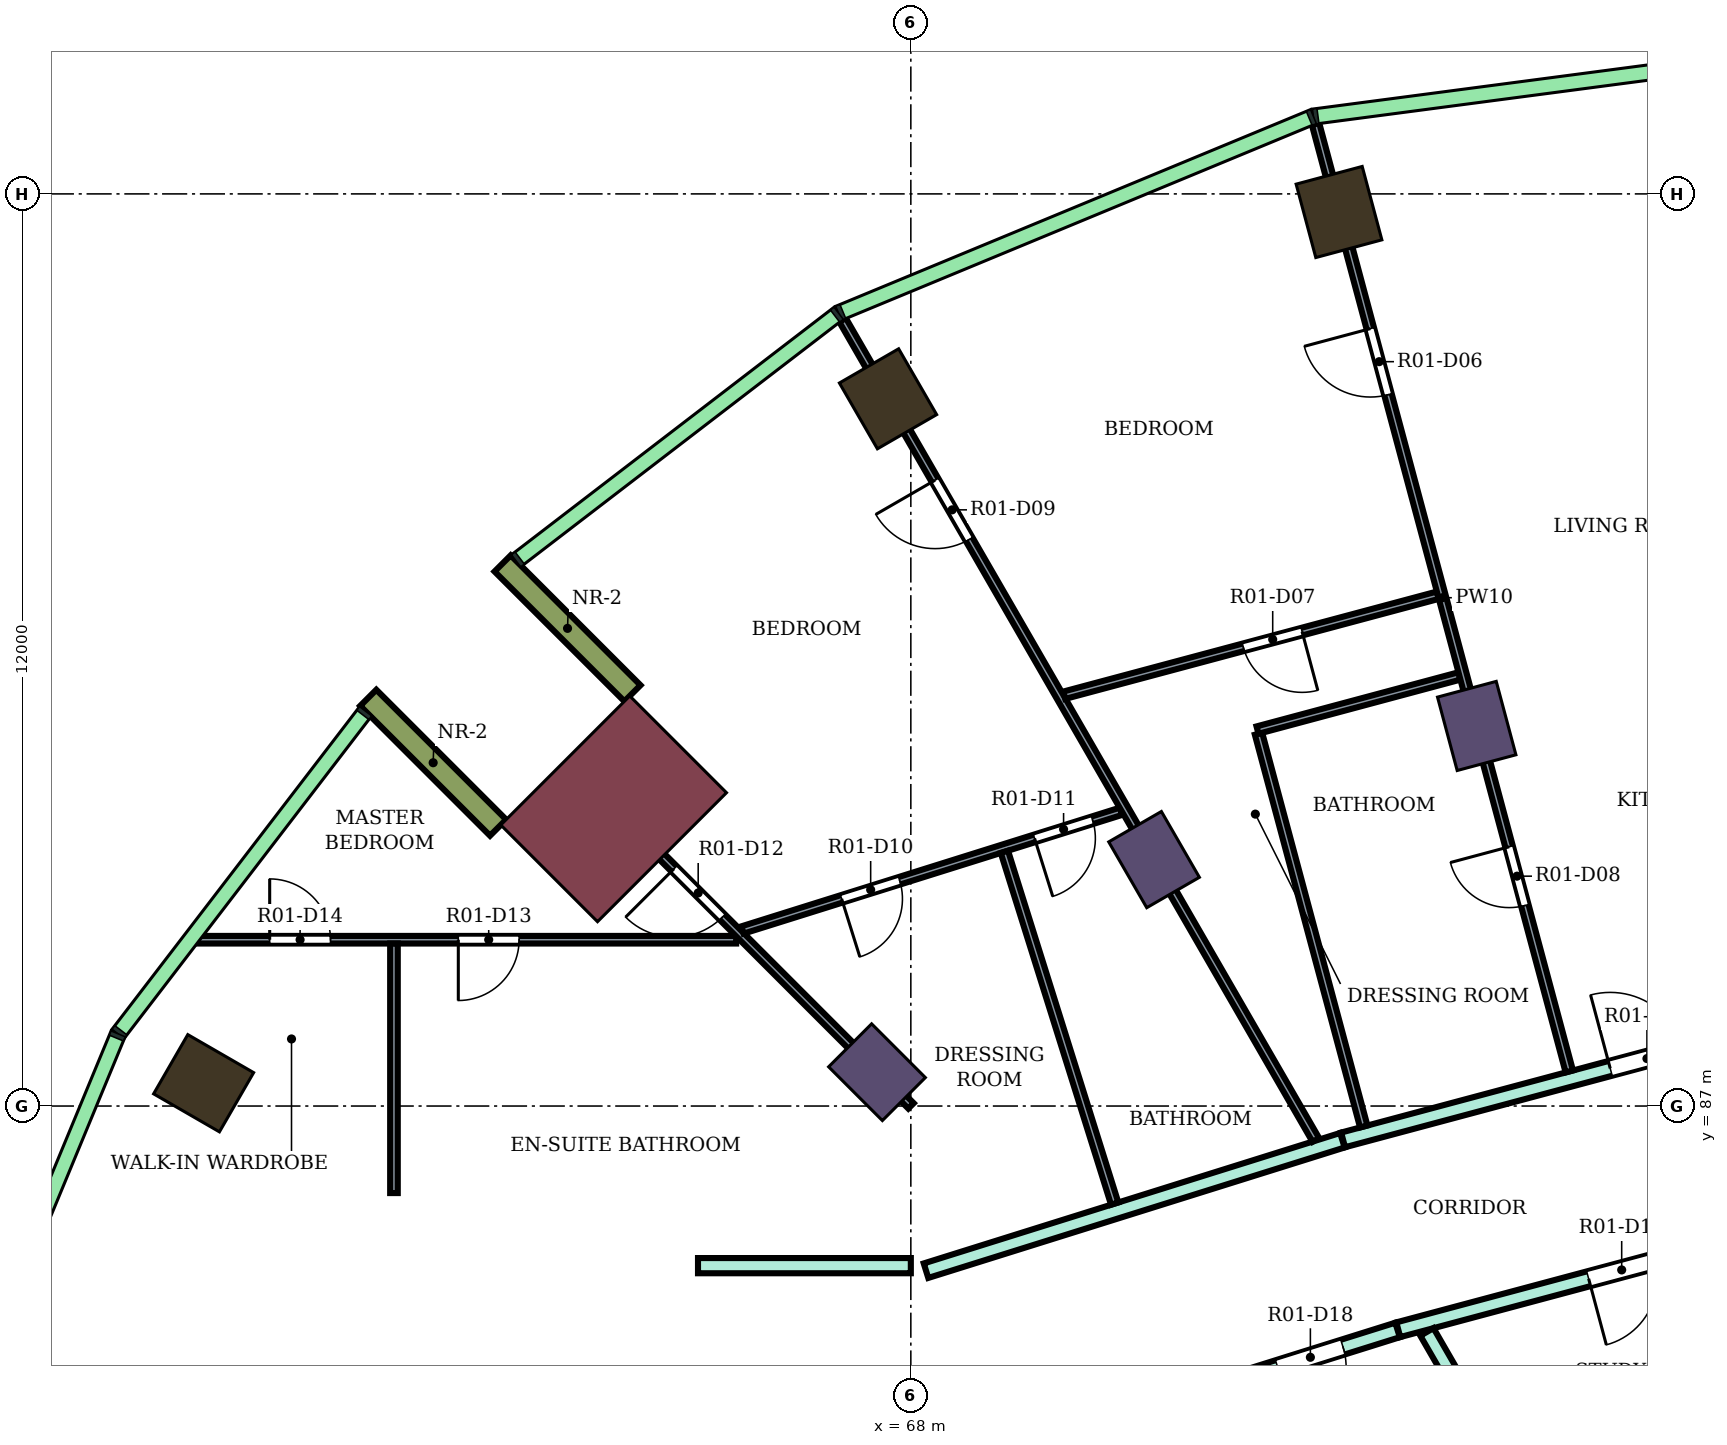
"""IFC4 building model, lengths in metres.
Left out: names, types, materials, properties, quantities, classifications, styles, units other than length and angle.
Written with IfcOpenShell. Run it as: python <this file> out.ifc"""

import sys

from ifc_helpers import new_model, si_unit, direction, frame, frame_2d, origin, origin_2d, place, context, subcontext, project, spatial, rectangle, extrude, element, fill, save


model = new_model("IFC4")
c1 = context("Model", 3, precision=1e-05, world=origin(), true_north=direction((0.0, 1.0)))
c2 = subcontext(c1, "Body", "Model", "MODEL_VIEW")
j1 = project(units=[si_unit("LENGTHUNIT", "METRE"), si_unit("PLANEANGLEUNIT", "RADIAN")], contexts=[c1])
p1 = place(None, origin())
s1 = spatial("IfcSite", under=j1, at=p1, CompositionType="ELEMENT")
p2 = place(p1, origin())
s2 = spatial("IfcBuilding", under=s1, at=p2, CompositionType="ELEMENT")
p3 = place(p2, frame((0.0, 0.0, 165.9)))
s3 = spatial("IfcBuildingStorey", under=s2, at=p3, CompositionType="ELEMENT", Elevation=165.9)
for number, where, z_axis, x_axis in (
    (1, (73.633, 98.762, 0.0), (0.0, 0.0, 1.0), (-0.259, 0.966, 0.0)),
    (2, (67.7, 96.304, 0.0), (0.0, 0.0, 1.0), (-0.5, 0.866, 0.0)),
    (3, (58.696, 87.3, 0.0), (0.0, 0.0, 1.0), (-0.866, 0.5, 0.0)),
):
    element("IfcColumn", number, at=place(p3, frame(where, z_axis=z_axis, x_axis=x_axis)), inside=s3, PredefinedType="COLUMN", context=c2, shape_type="SweptSolid", body=[
        extrude(rectangle(XDim=1.0, YDim=0.9, at=origin_2d()), origin(), (0.0, 0.0, 1.0), 4.1),
    ])
for number, where, z_axis, x_axis in (
    (4, (75.445, 92.0, 0.0), (0.0, 0.0, 1.0), (-0.259, 0.966, 0.0)),
    (5, (71.2, 90.242, 0.0), (0.0, 0.0, 1.0), (-0.5, 0.866, 0.0)),
    (6, (67.555, 87.445, 0.0), (0.0, 0.0, 1.0), (-0.707, 0.707, 0.0)),
):
    element("IfcColumn", number, at=place(p3, frame(where, z_axis=z_axis, x_axis=x_axis)), inside=s3, PredefinedType="COLUMN", context=c2, shape_type="SweptSolid", body=[
        extrude(rectangle(XDim=1.0, YDim=0.8, at=origin_2d()), origin(), (0.0, 0.0, 1.0), 4.1),
    ])
p4 = place(p3, frame((64.09, 90.91, 0.0), z_axis=(0.0, 0.0, 1.0), x_axis=(-0.707106781187, 0.707106781187, 0.0)))
e7 = element("IfcColumn", 7, at=p4, inside=s3, PredefinedType="COLUMN", context=c2, shape_type="SweptSolid", body=[
    extrude(rectangle(XDim=1.8, YDim=2.4, at=origin_2d()), origin(), (0.0, 0.0, 1.0), 4.1),
])
for number, where, z_axis, x_axis in (
    (8, (64.338, 92.43, 0.0), (0.0, 0.0, 1.0), (-0.707, 0.707, 0.0)),
    (9, (62.57, 90.662, 0.0), (0.0, 0.0, 1.0), (-0.707, 0.707, 0.0)),
):
    element("IfcWall", number, at=place(p3, frame(where, z_axis=z_axis, x_axis=x_axis)), inside=s3, PredefinedType="NOTDEFINED", context=c2, shape_type="SweptSolid", body=[
        extrude(rectangle(XDim=2.416, YDim=0.3, at=frame_2d((1.208, 0.0))), origin(), (0.0, 0.0, 1.0), 4.1),
    ])
p5 = place(p3, frame((65.2, 84.9, 0.0), z_axis=(0.0, 0.0, 1.0), x_axis=(1.0, 0.0, 0.0)))
e10 = element("IfcWall", 10, at=p5, inside=s3, PredefinedType="PARTITIONING", context=c2, shape_type="SweptSolid", body=[
    extrude(rectangle(XDim=2.8, YDim=0.2, at=frame_2d((1.4, 0.0))), origin(), (0.0, 0.0, 1.0), 3.65),
])
p6 = place(p3, frame((68.2, 84.834, 0.0), z_axis=(0.0, 0.0, 1.0), x_axis=(0.954272398161, 0.298938438661, 0.0)))
e11 = element("IfcWall", 11, at=p6, inside=s3, PredefinedType="PARTITIONING", context=c2, shape_type="SweptSolid", body=[
    extrude(rectangle(XDim=5.74, YDim=0.2, at=frame_2d((2.87, 0.0))), origin(), (0.0, 0.0, 1.0), 3.65),
])
p7 = place(p3, frame((72.1, 83.332, 0.0), z_axis=(0.0, 0.0, 1.0), x_axis=(0.954233106619, 0.299063836383, 0.0)))
e12 = element("IfcWall", 12, at=p7, inside=s3, PredefinedType="PARTITIONING", context=c2, shape_type="SweptSolid", body=[
    extrude(rectangle(XDim=2.414, YDim=0.2, at=frame_2d((1.207, 0.0))), origin(), (0.0, 0.0, 1.0), 3.65),
])
p8 = place(p7, frame((0.762, 0.0, 0.0)))
e13 = element("IfcOpeningElement", 13, at=p8, cuts=e12, PredefinedType="OPENING", context=c2, shape_type="SweptSolid", body=[
    extrude(rectangle(XDim=0.9, YDim=2.1, at=frame_2d((0.45, 1.05))), frame((0.0, 0.11, 0.0), z_axis=(0.0, -1.0, 0.0), x_axis=(1.0, 0.0, 0.0)), (0.0, 0.0, 1.0), 0.22),
])
p9 = place(p3, frame((73.687, 86.554, 0.0), z_axis=(0.0, 0.0, 1.0), x_axis=(0.965999420828, 0.258544230182, 0.0)))
e14 = element("IfcWall", 14, at=p9, inside=s3, PredefinedType="PARTITIONING", context=c2, shape_type="SweptSolid", body=[
    extrude(rectangle(XDim=6.446, YDim=0.2, at=frame_2d((3.223, 0.0))), origin(), (0.0, 0.0, 1.0), 3.65),
])
p10 = place(p9, frame((3.638, 0.0, 0.0)))
e15 = element("IfcOpeningElement", 15, at=p10, cuts=e14, PredefinedType="OPENING", context=c2, shape_type="SweptSolid", body=[
    extrude(rectangle(XDim=1.0, YDim=2.1, at=frame_2d((0.5, 1.05))), frame((0.0, 0.11, 0.0), z_axis=(0.0, -1.0, 0.0), x_axis=(1.0, 0.0, 0.0)), (0.0, 0.0, 1.0), 0.22),
])
p11 = place(p3, frame((74.413, 84.057, 0.0), z_axis=(0.0, 0.0, 1.0), x_axis=(0.965972135939, 0.258646153246, 0.0)))
e16 = element("IfcWall", 16, at=p11, inside=s3, PredefinedType="PARTITIONING", context=c2, shape_type="SweptSolid", body=[
    extrude(rectangle(XDim=5.654, YDim=0.2, at=frame_2d((2.827, 0.0))), origin(), (0.0, 0.0, 1.0), 3.65),
])
p12 = place(p11, frame((2.593, 0.0, 0.0)))
e17 = element("IfcOpeningElement", 17, at=p12, cuts=e16, PredefinedType="OPENING", context=c2, shape_type="SweptSolid", body=[
    extrude(rectangle(XDim=0.9, YDim=2.1, at=frame_2d((0.45, 1.05))), frame((0.0, 0.11, 0.0), z_axis=(0.0, -1.0, 0.0), x_axis=(1.0, 0.0, 0.0)), (0.0, 0.0, 1.0), 0.22),
])
p13 = place(p3, frame((74.79, 84.028, 0.0), z_axis=(0.0, 0.0, 1.0), x_axis=(0.499905962189, -0.866079689733, 0.0)))
e18 = element("IfcWall", 18, at=p13, inside=s3, PredefinedType="PARTITIONING", context=c2, shape_type="SweptSolid", body=[
    extrude(rectangle(XDim=2.726, YDim=0.2, at=frame_2d((1.363, 0.0))), origin(), (0.0, 0.0, 1.0), 3.65),
])
p14 = place(p3, frame((58.6, 89.188, 0.0), z_axis=(0.0, 0.0, 1.0), x_axis=(1.0, 0.0, 0.0)))
e19 = element("IfcWall", 19, at=p14, inside=s3, PredefinedType="PARTITIONING", context=c2, shape_type="SweptSolid", body=[
    extrude(rectangle(XDim=7.102, YDim=0.1, at=frame_2d((3.551, 0.0))), origin(), (0.0, 0.0, 1.0), 3.65),
])
p15 = place(p14, frame((3.447, 0.0, 0.0)))
e20 = element("IfcOpeningElement", 20, at=p15, cuts=e19, PredefinedType="OPENING", context=c2, shape_type="SweptSolid", body=[
    extrude(rectangle(XDim=0.8, YDim=2.1, at=frame_2d((0.4, 1.05))), frame((0.0, 0.06, 0.0), z_axis=(0.0, -1.0, 0.0), x_axis=(1.0, 0.0, 0.0)), (0.0, 0.0, 1.0), 0.12),
])
p16 = place(p14, frame((0.965, 0.0, 0.0)))
e21 = element("IfcOpeningElement", 21, at=p16, cuts=e19, PredefinedType="OPENING", context=c2, shape_type="SweptSolid", body=[
    extrude(rectangle(XDim=0.8, YDim=2.1, at=frame_2d((0.4, 1.05))), frame((0.0, 0.06, 0.0), z_axis=(0.0, -1.0, 0.0), x_axis=(1.0, 0.0, 0.0)), (0.0, 0.0, 1.0), 0.12),
])
p17 = place(p3, frame((61.2, 85.855, 0.0), z_axis=(0.0, 0.0, 1.0), x_axis=(0.0, 1.0, 0.0)))
e22 = element("IfcWall", 22, at=p17, inside=s3, PredefinedType="PARTITIONING", context=c2, shape_type="SweptSolid", body=[
    extrude(rectangle(XDim=3.283, YDim=0.1, at=frame_2d((1.642, 0.0))), origin(), (0.0, 0.0, 1.0), 3.65),
])
p18 = place(p3, frame((63.598, 91.408, 0.0), z_axis=(0.0, 0.0, 1.0), x_axis=(0.70693039891, -0.707283119477, 0.0)))
e23 = element("IfcWall", 23, at=p18, inside=s3, PredefinedType="PARTITIONING", context=c2, shape_type="SweptSolid", body=[
    extrude(rectangle(XDim=6.229, YDim=0.1, at=frame_2d((3.115, 0.0))), origin(), (0.0, 0.0, 1.0), 3.65),
])
p19 = place(p18, frame((1.819, 0.0, 0.0)))
e24 = element("IfcOpeningElement", 24, at=p19, cuts=e23, PredefinedType="OPENING", context=c2, shape_type="SweptSolid", body=[
    extrude(rectangle(XDim=0.9, YDim=2.1, at=frame_2d((0.45, 1.05))), frame((0.0, 0.06, 0.0), z_axis=(0.0, -1.0, 0.0), x_axis=(1.0, 0.0, 0.0)), (0.0, 0.0, 1.0), 0.12),
])
p20 = place(p3, frame((65.785, 89.316, 0.0), z_axis=(0.0, 0.0, 1.0), x_axis=(0.954187348418, 0.299209799504, 0.0)))
e25 = element("IfcWall", 25, at=p20, inside=s3, PredefinedType="PARTITIONING", context=c2, shape_type="SweptSolid", body=[
    extrude(rectangle(XDim=5.219, YDim=0.1, at=frame_2d((2.609, 0.0))), origin(), (0.0, 0.0, 1.0), 3.65),
])
p21 = place(p20, frame((1.367, 0.0, 0.0)))
e26 = element("IfcOpeningElement", 26, at=p21, cuts=e25, PredefinedType="OPENING", context=c2, shape_type="SweptSolid", body=[
    extrude(rectangle(XDim=0.8, YDim=2.1, at=frame_2d((0.4, 1.05))), frame((0.0, 0.06, 0.0), z_axis=(0.0, -1.0, 0.0), x_axis=(1.0, 0.0, 0.0)), (0.0, 0.0, 1.0), 0.12),
])
p22 = place(p20, frame((4.027, 0.0, 0.0)))
e27 = element("IfcOpeningElement", 27, at=p22, cuts=e25, PredefinedType="OPENING", context=c2, shape_type="SweptSolid", body=[
    extrude(rectangle(XDim=0.8, YDim=2.1, at=frame_2d((0.4, 1.05))), frame((0.0, 0.06, 0.0), z_axis=(0.0, -1.0, 0.0), x_axis=(1.0, 0.0, 0.0)), (0.0, 0.0, 1.0), 0.12),
])
p23 = place(p3, frame((67.101, 97.342, 0.0), z_axis=(0.0, 0.0, 1.0), x_axis=(0.499929451451, -0.866066131177, 0.0)))
e28 = element("IfcWall", 28, at=p23, inside=s3, PredefinedType="PARTITIONING", context=c2, shape_type="SweptSolid", body=[
    extrude(rectangle(XDim=12.456, YDim=0.1, at=frame_2d((6.228, 0.0))), origin(), (0.0, 0.0, 1.0), 3.65),
])
p24 = place(p23, frame((2.434, 0.0, 0.0)))
e29 = element("IfcOpeningElement", 29, at=p24, cuts=e28, PredefinedType="OPENING", context=c2, shape_type="SweptSolid", body=[
    extrude(rectangle(XDim=0.9, YDim=2.1, at=frame_2d((0.45, 1.05))), frame((0.0, 0.06, 0.0), z_axis=(0.0, -1.0, 0.0), x_axis=(1.0, 0.0, 0.0)), (0.0, 0.0, 1.0), 0.12),
])
p25 = place(p3, frame((69.231, 90.344, 0.0), z_axis=(0.0, 0.0, 1.0), x_axis=(0.299203490128, -0.954189326861, 0.0)))
e30 = element("IfcWall", 30, at=p25, inside=s3, PredefinedType="PARTITIONING", context=c2, shape_type="SweptSolid", body=[
    extrude(rectangle(XDim=4.85, YDim=0.1, at=frame_2d((2.425, 0.0))), origin(), (0.0, 0.0, 1.0), 3.65),
])
p26 = place(p3, frame((70.019, 92.405, 0.0), z_axis=(0.0, 0.0, 1.0), x_axis=(0.965982744428, 0.258606530209, 0.0)))
e31 = element("IfcWall", 31, at=p26, inside=s3, PredefinedType="PARTITIONING", context=c2, shape_type="SweptSolid", body=[
    extrude(rectangle(XDim=5.087, YDim=0.1, at=frame_2d((2.543, 0.0))), origin(), (0.0, 0.0, 1.0), 3.65),
])
p27 = place(p26, frame((2.438, 0.0, 0.0)))
e32 = element("IfcOpeningElement", 32, at=p27, cuts=e31, PredefinedType="OPENING", context=c2, shape_type="SweptSolid", body=[
    extrude(rectangle(XDim=0.8, YDim=2.1, at=frame_2d((0.4, 1.05))), frame((0.0, 0.06, 0.0), z_axis=(0.0, -1.0, 0.0), x_axis=(1.0, 0.0, 0.0)), (0.0, 0.0, 1.0), 0.12),
])
p28 = place(p3, frame((72.574, 91.898, 0.0), z_axis=(0.0, 0.0, 1.0), x_axis=(0.258739127054, -0.965947236722, 0.0)))
e33 = element("IfcWall", 33, at=p28, inside=s3, PredefinedType="PARTITIONING", context=c2, shape_type="SweptSolid", body=[
    extrude(rectangle(XDim=5.349, YDim=0.1, at=frame_2d((2.675, 0.0))), origin(), (0.0, 0.0, 1.0), 3.65),
])
p29 = place(p3, frame((72.561, 91.946, 0.0), z_axis=(0.0, 0.0, 1.0), x_axis=(0.96591000446, 0.258878085754, 0.0)))
e34 = element("IfcWall", 34, at=p29, inside=s3, PredefinedType="PARTITIONING", context=c2, shape_type="SweptSolid", body=[
    extrude(rectangle(XDim=2.75, YDim=0.1, at=frame_2d((1.375, 0.0))), origin(), (0.0, 0.0, 1.0), 3.65),
])
p30 = place(p3, frame((73.324, 99.92, 0.0), z_axis=(0.0, 0.0, 1.0), x_axis=(0.258710550884, -0.965954890697, 0.0)))
e35 = element("IfcWall", 35, at=p30, inside=s3, PredefinedType="PARTITIONING", context=c2, shape_type="SweptSolid", body=[
    extrude(rectangle(XDim=12.904, YDim=0.1, at=frame_2d((6.452, 0.0))), origin(), (0.0, 0.0, 1.0), 3.65),
])
p31 = place(p30, frame((2.787, 0.0, 0.0)))
e36 = element("IfcOpeningElement", 36, at=p31, cuts=e35, PredefinedType="OPENING", context=c2, shape_type="SweptSolid", body=[
    extrude(rectangle(XDim=0.9, YDim=2.1, at=frame_2d((0.45, 1.05))), frame((0.0, 0.06, 0.0), z_axis=(0.0, -1.0, 0.0), x_axis=(1.0, 0.0, 0.0)), (0.0, 0.0, 1.0), 0.12),
])
p32 = place(p30, frame((9.844, 0.0, 0.0)))
e37 = element("IfcOpeningElement", 37, at=p32, cuts=e35, PredefinedType="OPENING", context=c2, shape_type="SweptSolid", body=[
    extrude(rectangle(XDim=0.8, YDim=2.1, at=frame_2d((0.4, 1.05))), frame((0.0, 0.06, 0.0), z_axis=(0.0, -1.0, 0.0), x_axis=(1.0, 0.0, 0.0)), (0.0, 0.0, 1.0), 0.12),
])
p33 = place(p10, origin())
e38 = element("IfcDoor", 38, at=p33, inside=s3, OperationType="SINGLE_SWING_LEFT", PredefinedType="DOOR", context=c2, shape_type="SweptSolid", body=[
    extrude(rectangle(XDim=1.0, YDim=2.1, at=frame_2d((0.5, 1.05))), frame((0.0, 0.025, 0.0), z_axis=(0.0, -1.0, 0.0), x_axis=(1.0, 0.0, 0.0)), (0.0, 0.0, 1.0), 0.05),
])
fill(e15, e38)
p34 = place(p31, frame((0.9, 0.0, 0.0), z_axis=(0.0, 0.0, 1.0), x_axis=(-1.0, 0.0, 0.0)))
e39 = element("IfcDoor", 39, at=p34, inside=s3, OperationType="SINGLE_SWING_RIGHT", PredefinedType="DOOR", context=c2, shape_type="SweptSolid", body=[
    extrude(rectangle(XDim=0.9, YDim=2.1, at=frame_2d((0.45, 1.05))), frame((0.0, 0.025, 0.0), z_axis=(0.0, -1.0, 0.0), x_axis=(1.0, 0.0, 0.0)), (0.0, 0.0, 1.0), 0.05),
])
fill(e36, e39)
p35 = place(p27, frame((0.8, 0.0, 0.0), z_axis=(0.0, 0.0, 1.0), x_axis=(-1.0, 0.0, 0.0)))
e40 = element("IfcDoor", 40, at=p35, inside=s3, OperationType="SINGLE_SWING_LEFT", PredefinedType="DOOR", context=c2, shape_type="SweptSolid", body=[
    extrude(rectangle(XDim=0.8, YDim=2.1, at=frame_2d((0.4, 1.05))), frame((0.0, 0.025, 0.0), z_axis=(0.0, -1.0, 0.0), x_axis=(1.0, 0.0, 0.0)), (0.0, 0.0, 1.0), 0.05),
])
fill(e32, e40)
p36 = place(p32, frame((0.8, 0.0, 0.0), z_axis=(0.0, 0.0, 1.0), x_axis=(-1.0, 0.0, 0.0)))
e41 = element("IfcDoor", 41, at=p36, inside=s3, OperationType="SINGLE_SWING_RIGHT", PredefinedType="DOOR", context=c2, shape_type="SweptSolid", body=[
    extrude(rectangle(XDim=0.8, YDim=2.1, at=frame_2d((0.4, 1.05))), frame((0.0, 0.025, 0.0), z_axis=(0.0, -1.0, 0.0), x_axis=(1.0, 0.0, 0.0)), (0.0, 0.0, 1.0), 0.05),
])
fill(e37, e41)
p37 = place(p24, frame((0.9, 0.0, 0.0), z_axis=(0.0, 0.0, 1.0), x_axis=(-1.0, 0.0, 0.0)))
e42 = element("IfcDoor", 42, at=p37, inside=s3, OperationType="SINGLE_SWING_RIGHT", PredefinedType="DOOR", context=c2, shape_type="SweptSolid", body=[
    extrude(rectangle(XDim=0.9, YDim=2.1, at=frame_2d((0.45, 1.05))), frame((0.0, 0.025, 0.0), z_axis=(0.0, -1.0, 0.0), x_axis=(1.0, 0.0, 0.0)), (0.0, 0.0, 1.0), 0.05),
])
fill(e29, e42)
p38 = place(p21, frame((0.8, 0.0, 0.0), z_axis=(0.0, 0.0, 1.0), x_axis=(-1.0, 0.0, 0.0)))
e43 = element("IfcDoor", 43, at=p38, inside=s3, OperationType="SINGLE_SWING_RIGHT", PredefinedType="DOOR", context=c2, shape_type="SweptSolid", body=[
    extrude(rectangle(XDim=0.8, YDim=2.1, at=frame_2d((0.4, 1.05))), frame((0.0, 0.025, 0.0), z_axis=(0.0, -1.0, 0.0), x_axis=(1.0, 0.0, 0.0)), (0.0, 0.0, 1.0), 0.05),
])
fill(e26, e43)
p39 = place(p22, frame((0.8, 0.0, 0.0), z_axis=(0.0, 0.0, 1.0), x_axis=(-1.0, 0.0, 0.0)))
e44 = element("IfcDoor", 44, at=p39, inside=s3, OperationType="SINGLE_SWING_RIGHT", PredefinedType="DOOR", context=c2, shape_type="SweptSolid", body=[
    extrude(rectangle(XDim=0.8, YDim=2.1, at=frame_2d((0.4, 1.05))), frame((0.0, 0.025, 0.0), z_axis=(0.0, -1.0, 0.0), x_axis=(1.0, 0.0, 0.0)), (0.0, 0.0, 1.0), 0.05),
])
fill(e27, e44)
p40 = place(p19, frame((0.9, 0.0, 0.0), z_axis=(0.0, 0.0, 1.0), x_axis=(-1.0, 0.0, 0.0)))
e45 = element("IfcDoor", 45, at=p40, inside=s3, OperationType="SINGLE_SWING_RIGHT", PredefinedType="DOOR", context=c2, shape_type="SweptSolid", body=[
    extrude(rectangle(XDim=0.9, YDim=2.1, at=frame_2d((0.45, 1.05))), frame((0.0, 0.025, 0.0), z_axis=(0.0, -1.0, 0.0), x_axis=(1.0, 0.0, 0.0)), (0.0, 0.0, 1.0), 0.05),
])
fill(e24, e45)
p41 = place(p15, frame((0.8, 0.0, 0.0), z_axis=(0.0, 0.0, 1.0), x_axis=(-1.0, 0.0, 0.0)))
e46 = element("IfcDoor", 46, at=p41, inside=s3, OperationType="SINGLE_SWING_RIGHT", PredefinedType="DOOR", context=c2, shape_type="SweptSolid", body=[
    extrude(rectangle(XDim=0.8, YDim=2.1, at=frame_2d((0.4, 1.05))), frame((0.0, 0.025, 0.0), z_axis=(0.0, -1.0, 0.0), x_axis=(1.0, 0.0, 0.0)), (0.0, 0.0, 1.0), 0.05),
])
fill(e20, e46)
p42 = place(p16, origin())
e47 = element("IfcDoor", 47, at=p42, inside=s3, OperationType="SINGLE_SWING_LEFT", PredefinedType="DOOR", context=c2, shape_type="SweptSolid", body=[
    extrude(rectangle(XDim=0.8, YDim=2.1, at=frame_2d((0.4, 1.05))), frame((0.0, 0.025, 0.0), z_axis=(0.0, -1.0, 0.0), x_axis=(1.0, 0.0, 0.0)), (0.0, 0.0, 1.0), 0.05),
])
fill(e21, e47)
p43 = place(p12, frame((0.9, 0.0, 0.0), z_axis=(0.0, 0.0, 1.0), x_axis=(-1.0, 0.0, 0.0)))
e48 = element("IfcDoor", 48, at=p43, inside=s3, OperationType="SINGLE_SWING_RIGHT", PredefinedType="DOOR", context=c2, shape_type="SweptSolid", body=[
    extrude(rectangle(XDim=0.9, YDim=2.1, at=frame_2d((0.45, 1.05))), frame((0.0, 0.025, 0.0), z_axis=(0.0, -1.0, 0.0), x_axis=(1.0, 0.0, 0.0)), (0.0, 0.0, 1.0), 0.05),
])
fill(e17, e48)
p44 = place(p8, frame((0.9, 0.0, 0.0), z_axis=(0.0, 0.0, 1.0), x_axis=(-1.0, 0.0, 0.0)))
e49 = element("IfcDoor", 49, at=p44, inside=s3, OperationType="SINGLE_SWING_RIGHT", PredefinedType="DOOR", context=c2, shape_type="SweptSolid", body=[
    extrude(rectangle(XDim=0.9, YDim=2.1, at=frame_2d((0.45, 1.05))), frame((0.0, 0.025, 0.0), z_axis=(0.0, -1.0, 0.0), x_axis=(1.0, 0.0, 0.0)), (0.0, 0.0, 1.0), 0.05),
])
fill(e13, e49)
save(model, sys.argv[1])
